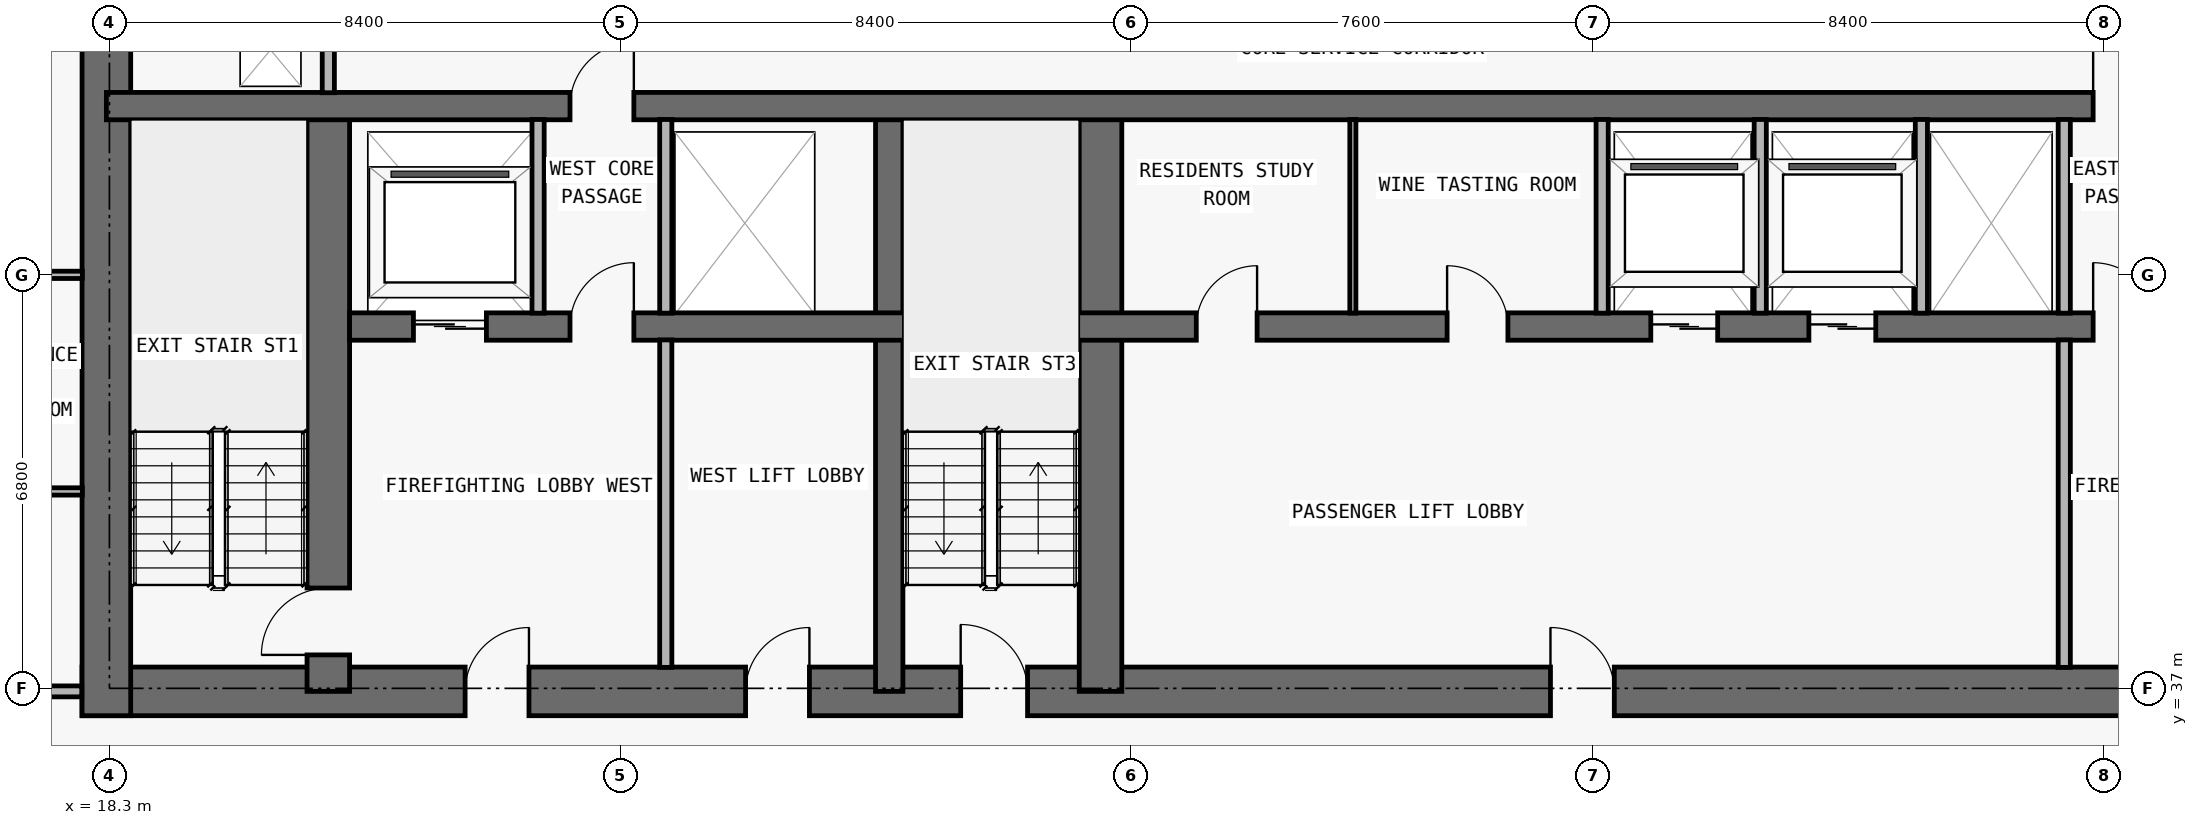
"""IFC4 building model, lengths in metres.
Left out: names, types, materials, properties, quantities, classifications, styles, units other than length and angle.
Written with IfcOpenShell. Run it as: python <this file> out.ifc"""

import sys

from ifc_helpers import new_model, si_unit, direction, frame, frame_2d, origin, place, context, subcontext, project, spatial, rectangle, extrude, element, fill, save


model = new_model("IFC4")
c1 = context("Model", 3, precision=1e-05, world=origin(), true_north=direction((0.0, 1.0)))
c2 = subcontext(c1, "Body", "Model", "MODEL_VIEW")
j1 = project(units=[si_unit("LENGTHUNIT", "METRE"), si_unit("PLANEANGLEUNIT", "RADIAN")], contexts=[c1])
p1 = place(None, origin())
s1 = spatial("IfcSite", under=j1, at=p1, CompositionType="ELEMENT")
p2 = place(p1, origin())
s2 = spatial("IfcBuilding", under=s1, at=p2, CompositionType="ELEMENT")
p3 = place(p2, frame((0.0, 0.0, 145.5)))
s3 = spatial("IfcBuildingStorey", under=s2, at=p3, CompositionType="ELEMENT", Elevation=145.5)
p4 = place(p3, frame((17.85, 36.95, 0.0), z_axis=(0.0, 0.0, 1.0), x_axis=(1.0, 0.0, 0.0)))
e1 = element("IfcWall", 1, at=p4, inside=s3, PredefinedType="SHEAR", context=c2, shape_type="SweptSolid", body=[
    extrude(rectangle(XDim=42.1, YDim=0.8, at=frame_2d((21.05, 0.0))), origin(), (0.0, 0.0, 1.0), 3.05),
])
p5 = place(p4, frame((14.45, 0.0, 0.0)))
e2 = element("IfcOpeningElement", 2, at=p5, cuts=e1, PredefinedType="OPENING", context=c2, shape_type="SweptSolid", body=[
    extrude(rectangle(XDim=1.1, YDim=2.15, at=frame_2d((0.55, 1.075))), frame((0.0, 0.41, 0.0), z_axis=(0.0, -1.0, 0.0), x_axis=(1.0, 0.0, 0.0)), (0.0, 0.0, 1.0), 0.82),
])
p6 = place(p4, frame((6.3, 0.0, 0.0)))
e3 = element("IfcOpeningElement", 3, at=p6, cuts=e1, PredefinedType="OPENING", context=c2, shape_type="SweptSolid", body=[
    extrude(rectangle(XDim=1.05, YDim=2.15, at=frame_2d((0.525, 1.075))), frame((0.0, 0.41, 0.0), z_axis=(0.0, -1.0, 0.0), x_axis=(1.0, 0.0, 0.0)), (0.0, 0.0, 1.0), 0.82),
])
p7 = place(p4, frame((34.8, 0.0, 0.0)))
e4 = element("IfcOpeningElement", 4, at=p7, cuts=e1, PredefinedType="OPENING", context=c2, shape_type="SweptSolid", body=[
    extrude(rectangle(XDim=1.05, YDim=2.15, at=frame_2d((0.525, 1.075))), frame((0.0, 0.41, 0.0), z_axis=(0.0, -1.0, 0.0), x_axis=(1.0, 0.0, 0.0)), (0.0, 0.0, 1.0), 0.82),
])
p8 = place(p4, frame((10.913, 0.0, 0.0)))
e5 = element("IfcOpeningElement", 5, at=p8, cuts=e1, PredefinedType="OPENING", context=c2, shape_type="SweptSolid", body=[
    extrude(rectangle(XDim=1.05, YDim=2.15, at=frame_2d((0.525, 1.075))), frame((0.0, 0.41, 0.0), z_axis=(0.0, -1.0, 0.0), x_axis=(1.0, 0.0, 0.0)), (0.0, 0.0, 1.0), 0.82),
])
p9 = place(p4, frame((24.15, 0.0, 0.0)))
e6 = element("IfcOpeningElement", 6, at=p9, cuts=e1, PredefinedType="OPENING", context=c2, shape_type="SweptSolid", body=[
    extrude(rectangle(XDim=1.05, YDim=2.15, at=frame_2d((0.525, 1.075))), frame((0.0, 0.41, 0.0), z_axis=(0.0, -1.0, 0.0), x_axis=(1.0, 0.0, 0.0)), (0.0, 0.0, 1.0), 0.82),
])
p10 = place(p3, frame((18.25, 36.55, 0.0), z_axis=(0.0, 0.0, 1.0), x_axis=(0.0, 1.0, 0.0)))
e7 = element("IfcWall", 7, at=p10, inside=s3, PredefinedType="SHEAR", context=c2, shape_type="SweptSolid", body=[
    extrude(rectangle(XDim=14.05, YDim=0.8, at=frame_2d((7.025, 0.0))), origin(), (0.0, 0.0, 1.0), 3.05),
])
p11 = place(p3, frame((21.9, 36.95, 0.0), z_axis=(0.0, 0.0, 1.0), x_axis=(0.0, 1.0, 0.0)))
e8 = element("IfcWall", 8, at=p11, inside=s3, PredefinedType="SHEAR", context=c2, shape_type="SweptSolid", body=[
    extrude(rectangle(XDim=9.625, YDim=0.7, at=frame_2d((4.812, 0.0))), origin(), (0.0, 0.0, 1.0), 3.05),
])
p12 = place(p11, frame((0.6, 0.0, 0.0)))
e9 = element("IfcOpeningElement", 9, at=p12, cuts=e8, PredefinedType="OPENING", context=c2, shape_type="SweptSolid", body=[
    extrude(rectangle(XDim=1.1, YDim=2.15, at=frame_2d((0.55, 1.075))), frame((0.0, 0.36, 0.0), z_axis=(0.0, -1.0, 0.0), x_axis=(1.0, 0.0, 0.0)), (0.0, 0.0, 1.0), 0.72),
])
p13 = place(p3, frame((31.125, 36.95, 0.0), z_axis=(0.0, 0.0, 1.0), x_axis=(0.0, 1.0, 0.0)))
e10 = element("IfcWall", 10, at=p13, inside=s3, PredefinedType="SHEAR", context=c2, shape_type="SweptSolid", body=[
    extrude(rectangle(XDim=9.625, YDim=0.45, at=frame_2d((4.812, 0.0))), origin(), (0.0, 0.0, 1.0), 3.05),
])
p14 = place(p3, frame((34.6, 36.95, 0.0), z_axis=(0.0, 0.0, 1.0), x_axis=(0.0, 1.0, 0.0)))
e11 = element("IfcWall", 11, at=p14, inside=s3, PredefinedType="SHEAR", context=c2, shape_type="SweptSolid", body=[
    extrude(rectangle(XDim=9.625, YDim=0.7, at=frame_2d((4.812, 0.0))), origin(), (0.0, 0.0, 1.0), 3.05),
])
p15 = place(p3, frame((22.25, 42.95, 0.0), z_axis=(0.0, 0.0, 1.0), x_axis=(1.0, 0.0, 0.0)))
e12 = element("IfcWall", 12, at=p15, inside=s3, PredefinedType="SHEAR", context=c2, shape_type="SweptSolid", body=[
    extrude(rectangle(XDim=33.3, YDim=0.45, at=frame_2d((16.65, 0.0))), origin(), (0.0, 0.0, 1.0), 3.05),
])
p16 = place(p15, frame((1.05, 0.0, 0.0)))
e13 = element("IfcOpeningElement", 13, at=p16, cuts=e12, PredefinedType="OPENING", context=c2, shape_type="SweptSolid", body=[
    extrude(rectangle(XDim=1.2, YDim=2.2, at=frame_2d((0.6, 1.1))), frame((0.0, 0.235, 0.0), z_axis=(0.0, -1.0, 0.0), x_axis=(1.0, 0.0, 0.0)), (0.0, 0.0, 1.0), 0.47),
])
p17 = place(p15, frame((31.05, 0.0, 0.0)))
e14 = element("IfcOpeningElement", 14, at=p17, cuts=e12, PredefinedType="OPENING", context=c2, shape_type="SweptSolid", body=[
    extrude(rectangle(XDim=1.2, YDim=2.2, at=frame_2d((0.6, 1.1))), frame((0.0, 0.235, 0.0), z_axis=(0.0, -1.0, 0.0), x_axis=(1.0, 0.0, 0.0)), (0.0, 0.0, 1.0), 0.47),
])
p18 = place(p15, frame((21.4, 0.0, 0.0)))
e15 = element("IfcOpeningElement", 15, at=p18, cuts=e12, PredefinedType="OPENING", context=c2, shape_type="SweptSolid", body=[
    extrude(rectangle(XDim=1.1, YDim=2.2, at=frame_2d((0.55, 1.1))), frame((0.0, 0.235, 0.0), z_axis=(0.0, -1.0, 0.0), x_axis=(1.0, 0.0, 0.0)), (0.0, 0.0, 1.0), 0.47),
])
p19 = place(p15, frame((24.0, 0.0, 0.0)))
e16 = element("IfcOpeningElement", 16, at=p19, cuts=e12, PredefinedType="OPENING", context=c2, shape_type="SweptSolid", body=[
    extrude(rectangle(XDim=1.1, YDim=2.2, at=frame_2d((0.55, 1.1))), frame((0.0, 0.235, 0.0), z_axis=(0.0, -1.0, 0.0), x_axis=(1.0, 0.0, 0.0)), (0.0, 0.0, 1.0), 0.47),
])
p20 = place(p15, frame((3.625, 0.0, 0.0)))
e17 = element("IfcOpeningElement", 17, at=p20, cuts=e12, PredefinedType="OPENING", context=c2, shape_type="SweptSolid", body=[
    extrude(rectangle(XDim=1.05, YDim=2.15, at=frame_2d((0.525, 1.075))), frame((0.0, 0.235, 0.0), z_axis=(0.0, -1.0, 0.0), x_axis=(1.0, 0.0, 0.0)), (0.0, 0.0, 1.0), 0.47),
])
p21 = place(p15, frame((28.675, 0.0, 0.0)))
e18 = element("IfcOpeningElement", 18, at=p21, cuts=e12, PredefinedType="OPENING", context=c2, shape_type="SweptSolid", body=[
    extrude(rectangle(XDim=1.05, YDim=2.15, at=frame_2d((0.525, 1.075))), frame((0.0, 0.235, 0.0), z_axis=(0.0, -1.0, 0.0), x_axis=(1.0, 0.0, 0.0)), (0.0, 0.0, 1.0), 0.47),
])
p22 = place(p15, frame((13.925, 0.0, 0.0)))
e19 = element("IfcOpeningElement", 19, at=p22, cuts=e12, PredefinedType="OPENING", context=c2, shape_type="SweptSolid", body=[
    extrude(rectangle(XDim=1.0, YDim=2.2, at=frame_2d((0.5, 1.1))), frame((0.0, 0.235, 0.0), z_axis=(0.0, -1.0, 0.0), x_axis=(1.0, 0.0, 0.0)), (0.0, 0.0, 1.0), 0.47),
])
p23 = place(p15, frame((18.05, 0.0, 0.0)))
e20 = element("IfcOpeningElement", 20, at=p23, cuts=e12, PredefinedType="OPENING", context=c2, shape_type="SweptSolid", body=[
    extrude(rectangle(XDim=1.0, YDim=2.2, at=frame_2d((0.5, 1.1))), frame((0.0, 0.235, 0.0), z_axis=(0.0, -1.0, 0.0), x_axis=(1.0, 0.0, 0.0)), (0.0, 0.0, 1.0), 0.47),
])
p24 = place(p3, frame((18.25, 46.575, 0.0), z_axis=(0.0, 0.0, 1.0), x_axis=(1.0, 0.0, 0.0)))
e21 = element("IfcWall", 21, at=p24, inside=s3, PredefinedType="SHEAR", context=c2, shape_type="SweptSolid", body=[
    extrude(rectangle(XDim=41.3, YDim=0.45, at=frame_2d((20.65, 0.0))), origin(), (0.0, 0.0, 1.0), 3.05),
])
p25 = place(p24, frame((7.625, 0.0, 0.0)))
e22 = element("IfcOpeningElement", 22, at=p25, cuts=e21, PredefinedType="OPENING", context=c2, shape_type="SweptSolid", body=[
    extrude(rectangle(XDim=1.05, YDim=2.15, at=frame_2d((0.525, 1.075))), frame((0.0, 0.235, 0.0), z_axis=(0.0, -1.0, 0.0), x_axis=(1.0, 0.0, 0.0)), (0.0, 0.0, 1.0), 0.47),
])
p26 = place(p24, frame((32.675, 0.0, 0.0)))
e23 = element("IfcOpeningElement", 23, at=p26, cuts=e21, PredefinedType="OPENING", context=c2, shape_type="SweptSolid", body=[
    extrude(rectangle(XDim=1.05, YDim=2.15, at=frame_2d((0.525, 1.075))), frame((0.0, 0.235, 0.0), z_axis=(0.0, -1.0, 0.0), x_axis=(1.0, 0.0, 0.0)), (0.0, 0.0, 1.0), 0.47),
])
p27 = place(p3, frame((21.9, 46.795, 0.0), z_axis=(0.0, 0.0, 1.0), x_axis=(0.0, 1.0, 0.0)))
e24 = element("IfcWall", 24, at=p27, inside=s3, PredefinedType="PARTITIONING", context=c2, shape_type="SweptSolid", body=[
    extrude(rectangle(XDim=3.16, YDim=0.2, at=frame_2d((1.58, 0.0))), origin(), (0.0, 0.0, 1.0), 3.05),
])
p28 = place(p3, frame((25.35, 43.17, 0.0), z_axis=(0.0, 0.0, 1.0), x_axis=(0.0, 1.0, 0.0)))
e25 = element("IfcWall", 25, at=p28, inside=s3, PredefinedType="PARTITIONING", context=c2, shape_type="SweptSolid", body=[
    extrude(rectangle(XDim=3.185, YDim=0.2, at=frame_2d((1.593, 0.0))), origin(), (0.0, 0.0, 1.0), 3.05),
])
p29 = place(p3, frame((27.45, 37.345, 0.0), z_axis=(0.0, 0.0, 1.0), x_axis=(0.0, 1.0, 0.0)))
e26 = element("IfcWall", 26, at=p29, inside=s3, PredefinedType="PARTITIONING", context=c2, shape_type="SweptSolid", body=[
    extrude(rectangle(XDim=5.385, YDim=0.2, at=frame_2d((2.692, 0.0))), origin(), (0.0, 0.0, 1.0), 3.05),
])
p30 = place(p3, frame((27.45, 43.17, 0.0), z_axis=(0.0, 0.0, 1.0), x_axis=(0.0, 1.0, 0.0)))
e27 = element("IfcWall", 27, at=p30, inside=s3, PredefinedType="PARTITIONING", context=c2, shape_type="SweptSolid", body=[
    extrude(rectangle(XDim=3.185, YDim=0.2, at=frame_2d((1.593, 0.0))), origin(), (0.0, 0.0, 1.0), 3.05),
])
p31 = place(p3, frame((38.75, 43.17, 0.0), z_axis=(0.0, 0.0, 1.0), x_axis=(0.0, 1.0, 0.0)))
e28 = element("IfcWall", 28, at=p31, inside=s3, PredefinedType="MOVABLE", context=c2, shape_type="SweptSolid", body=[
    extrude(rectangle(XDim=3.185, YDim=0.1, at=frame_2d((1.593, 0.0))), origin(), (0.0, 0.0, 1.0), 3.05),
])
for number, where, z_axis, x_axis in (
    (29, (42.85, 43.17, 0.0), (0.0, 0.0, 1.0), (0.0, 1.0, 0.0)),
    (30, (45.45, 43.17, 0.0), (0.0, 0.0, 1.0), (0.0, 1.0, 0.0)),
    (31, (48.1, 43.17, 0.0), (0.0, 0.0, 1.0), (0.0, 1.0, 0.0)),
):
    element("IfcWall", number, at=place(p3, frame(where, z_axis=z_axis, x_axis=x_axis)), inside=s3, PredefinedType="PARTITIONING", context=c2, shape_type="SweptSolid", body=[
        extrude(rectangle(XDim=3.185, YDim=0.2, at=frame_2d((1.593, 0.0))), origin(), (0.0, 0.0, 1.0), 3.05),
    ])
p32 = place(p3, frame((50.45, 37.345, 0.0), z_axis=(0.0, 0.0, 1.0), x_axis=(0.0, 1.0, 0.0)))
e32 = element("IfcWall", 32, at=p32, inside=s3, PredefinedType="PARTITIONING", context=c2, shape_type="SweptSolid", body=[
    extrude(rectangle(XDim=5.385, YDim=0.2, at=frame_2d((2.692, 0.0))), origin(), (0.0, 0.0, 1.0), 3.05),
])
p33 = place(p3, frame((50.45, 43.17, 0.0), z_axis=(0.0, 0.0, 1.0), x_axis=(0.0, 1.0, 0.0)))
e33 = element("IfcWall", 33, at=p33, inside=s3, PredefinedType="PARTITIONING", context=c2, shape_type="SweptSolid", body=[
    extrude(rectangle(XDim=3.185, YDim=0.2, at=frame_2d((1.593, 0.0))), origin(), (0.0, 0.0, 1.0), 3.05),
])
p34 = place(p3, frame((7.7, 36.95, 0.0), z_axis=(0.0, 0.0, 1.0), x_axis=(1.0, 0.0, 0.0)))
e34 = element("IfcWall", 34, at=p34, inside=s3, PredefinedType="PARTITIONING", context=c2, shape_type="SweptSolid", body=[
    extrude(rectangle(XDim=10.145, YDim=0.18, at=frame_2d((5.073, 0.0))), origin(), (0.0, 0.0, 1.0), 3.05),
])
p35 = place(p34, frame((5.188, 0.0, 0.0)))
e35 = element("IfcOpeningElement", 35, at=p35, cuts=e34, PredefinedType="OPENING", context=c2, shape_type="SweptSolid", body=[
    extrude(rectangle(XDim=1.0, YDim=2.2, at=frame_2d((0.5, 1.1))), frame((0.0, 0.1, 0.0), z_axis=(0.0, -1.0, 0.0), x_axis=(1.0, 0.0, 0.0)), (0.0, 0.0, 1.0), 0.2),
])
p36 = place(p3, frame((15.6, 40.238, 0.0), z_axis=(0.0, 0.0, 1.0), x_axis=(1.0, 0.0, 0.0)))
e36 = element("IfcWall", 36, at=p36, inside=s3, PredefinedType="PARTITIONING", context=c2, shape_type="SweptSolid", body=[
    extrude(rectangle(XDim=2.255, YDim=0.12, at=frame_2d((1.127, 0.0))), origin(), (0.0, 0.0, 1.0), 3.05),
])
p37 = place(p3, frame((4.195, 43.8, 0.0), z_axis=(0.0, 0.0, 1.0), x_axis=(1.0, 0.0, 0.0)))
e37 = element("IfcWall", 37, at=p37, inside=s3, PredefinedType="PARTITIONING", context=c2, shape_type="SweptSolid", body=[
    extrude(rectangle(XDim=13.66, YDim=0.12, at=frame_2d((6.83, 0.0))), origin(), (0.0, 0.0, 1.0), 2.339),
])
p38 = place(p37, frame((8.743, 0.0, 0.0)))
e38 = element("IfcOpeningElement", 38, at=p38, cuts=e37, PredefinedType="OPENING", context=c2, shape_type="SweptSolid", body=[
    extrude(rectangle(XDim=0.9, YDim=2.15, at=frame_2d((0.45, 1.075))), frame((0.0, 0.07, 0.0), z_axis=(0.0, -1.0, 0.0), x_axis=(1.0, 0.0, 0.0)), (0.0, 0.0, 1.0), 0.14),
])
p39 = place(p37, frame((12.107, 0.0, 0.0)))
e39 = element("IfcOpeningElement", 39, at=p39, cuts=e37, PredefinedType="OPENING", context=c2, shape_type="SweptSolid", body=[
    extrude(rectangle(XDim=0.85, YDim=2.1, at=frame_2d((0.425, 1.05))), frame((0.0, 0.07, 0.0), z_axis=(0.0, -1.0, 0.0), x_axis=(1.0, 0.0, 0.0)), (0.0, 0.0, 1.0), 0.14),
])
p40 = place(p16, origin())
e40 = element("IfcDoor", 40, at=p40, inside=s3, OperationType="DOUBLE_DOOR_SLIDING", PredefinedType="DOOR", context=c2, shape_type="SweptSolid", body=[
    extrude(rectangle(XDim=1.2, YDim=2.2, at=frame_2d((0.6, 1.1))), frame((0.0, 0.025, 0.0), z_axis=(0.0, -1.0, 0.0), x_axis=(1.0, 0.0, 0.0)), (0.0, 0.0, 1.0), 0.05),
])
fill(e13, e40)
p41 = place(p18, origin())
e41 = element("IfcDoor", 41, at=p41, inside=s3, OperationType="DOUBLE_DOOR_SLIDING", PredefinedType="DOOR", context=c2, shape_type="SweptSolid", body=[
    extrude(rectangle(XDim=1.1, YDim=2.2, at=frame_2d((0.55, 1.1))), frame((0.0, 0.025, 0.0), z_axis=(0.0, -1.0, 0.0), x_axis=(1.0, 0.0, 0.0)), (0.0, 0.0, 1.0), 0.05),
])
fill(e15, e41)
p42 = place(p19, origin())
e42 = element("IfcDoor", 42, at=p42, inside=s3, OperationType="DOUBLE_DOOR_SLIDING", PredefinedType="DOOR", context=c2, shape_type="SweptSolid", body=[
    extrude(rectangle(XDim=1.1, YDim=2.2, at=frame_2d((0.55, 1.1))), frame((0.0, 0.025, 0.0), z_axis=(0.0, -1.0, 0.0), x_axis=(1.0, 0.0, 0.0)), (0.0, 0.0, 1.0), 0.05),
])
fill(e16, e42)
p43 = place(p5, origin())
e43 = element("IfcDoor", 43, at=p43, inside=s3, OperationType="SINGLE_SWING_LEFT", PredefinedType="DOOR", context=c2, shape_type="SweptSolid", body=[
    extrude(rectangle(XDim=1.1, YDim=2.15, at=frame_2d((0.55, 1.075))), frame((0.0, 0.025, 0.0), z_axis=(0.0, -1.0, 0.0), x_axis=(1.0, 0.0, 0.0)), (0.0, 0.0, 1.0), 0.05),
])
fill(e2, e43)
p44 = place(p6, origin())
e44 = element("IfcDoor", 44, at=p44, inside=s3, OperationType="SINGLE_SWING_RIGHT", PredefinedType="DOOR", context=c2, shape_type="SweptSolid", body=[
    extrude(rectangle(XDim=1.05, YDim=2.15, at=frame_2d((0.525, 1.075))), frame((0.0, 0.025, 0.0), z_axis=(0.0, -1.0, 0.0), x_axis=(1.0, 0.0, 0.0)), (0.0, 0.0, 1.0), 0.05),
])
fill(e3, e44)
p45 = place(p12, origin())
e45 = element("IfcDoor", 45, at=p45, inside=s3, OperationType="SINGLE_SWING_LEFT", PredefinedType="DOOR", context=c2, shape_type="SweptSolid", body=[
    extrude(rectangle(XDim=1.1, YDim=2.15, at=frame_2d((0.55, 1.075))), frame((0.0, 0.025, 0.0), z_axis=(0.0, -1.0, 0.0), x_axis=(1.0, 0.0, 0.0)), (0.0, 0.0, 1.0), 0.05),
])
fill(e9, e45)
p46 = place(p20, origin())
e46 = element("IfcDoor", 46, at=p46, inside=s3, OperationType="SINGLE_SWING_RIGHT", PredefinedType="DOOR", context=c2, shape_type="SweptSolid", body=[
    extrude(rectangle(XDim=1.05, YDim=2.15, at=frame_2d((0.525, 1.075))), frame((0.0, 0.025, 0.0), z_axis=(0.0, -1.0, 0.0), x_axis=(1.0, 0.0, 0.0)), (0.0, 0.0, 1.0), 0.05),
])
fill(e17, e46)
p47 = place(p21, origin())
e47 = element("IfcDoor", 47, at=p47, inside=s3, OperationType="SINGLE_SWING_LEFT", PredefinedType="DOOR", context=c2, shape_type="SweptSolid", body=[
    extrude(rectangle(XDim=1.05, YDim=2.15, at=frame_2d((0.525, 1.075))), frame((0.0, 0.025, 0.0), z_axis=(0.0, -1.0, 0.0), x_axis=(1.0, 0.0, 0.0)), (0.0, 0.0, 1.0), 0.05),
])
fill(e18, e47)
p48 = place(p8, origin())
e48 = element("IfcDoor", 48, at=p48, inside=s3, OperationType="SINGLE_SWING_RIGHT", PredefinedType="DOOR", context=c2, shape_type="SweptSolid", body=[
    extrude(rectangle(XDim=1.05, YDim=2.15, at=frame_2d((0.525, 1.075))), frame((0.0, 0.025, 0.0), z_axis=(0.0, -1.0, 0.0), x_axis=(1.0, 0.0, 0.0)), (0.0, 0.0, 1.0), 0.05),
])
fill(e5, e48)
p49 = place(p9, origin())
e49 = element("IfcDoor", 49, at=p49, inside=s3, OperationType="SINGLE_SWING_LEFT", PredefinedType="DOOR", context=c2, shape_type="SweptSolid", body=[
    extrude(rectangle(XDim=1.05, YDim=2.15, at=frame_2d((0.525, 1.075))), frame((0.0, 0.025, 0.0), z_axis=(0.0, -1.0, 0.0), x_axis=(1.0, 0.0, 0.0)), (0.0, 0.0, 1.0), 0.05),
])
fill(e6, e49)
p50 = place(p22, origin())
e50 = element("IfcDoor", 50, at=p50, inside=s3, OperationType="SINGLE_SWING_RIGHT", PredefinedType="DOOR", context=c2, shape_type="SweptSolid", body=[
    extrude(rectangle(XDim=1.0, YDim=2.2, at=frame_2d((0.5, 1.1))), frame((0.0, 0.025, 0.0), z_axis=(0.0, -1.0, 0.0), x_axis=(1.0, 0.0, 0.0)), (0.0, 0.0, 1.0), 0.05),
])
fill(e19, e50)
p51 = place(p23, origin())
e51 = element("IfcDoor", 51, at=p51, inside=s3, OperationType="SINGLE_SWING_LEFT", PredefinedType="DOOR", context=c2, shape_type="SweptSolid", body=[
    extrude(rectangle(XDim=1.0, YDim=2.2, at=frame_2d((0.5, 1.1))), frame((0.0, 0.025, 0.0), z_axis=(0.0, -1.0, 0.0), x_axis=(1.0, 0.0, 0.0)), (0.0, 0.0, 1.0), 0.05),
])
fill(e20, e51)
p52 = place(p25, origin())
e52 = element("IfcDoor", 52, at=p52, inside=s3, OperationType="SINGLE_SWING_RIGHT", PredefinedType="DOOR", context=c2, shape_type="SweptSolid", body=[
    extrude(rectangle(XDim=1.05, YDim=2.15, at=frame_2d((0.525, 1.075))), frame((0.0, 0.025, 0.0), z_axis=(0.0, -1.0, 0.0), x_axis=(1.0, 0.0, 0.0)), (0.0, 0.0, 1.0), 0.05),
])
fill(e22, e52)
p53 = place(p26, origin())
e53 = element("IfcDoor", 53, at=p53, inside=s3, OperationType="SINGLE_SWING_LEFT", PredefinedType="DOOR", context=c2, shape_type="SweptSolid", body=[
    extrude(rectangle(XDim=1.05, YDim=2.15, at=frame_2d((0.525, 1.075))), frame((0.0, 0.025, 0.0), z_axis=(0.0, -1.0, 0.0), x_axis=(1.0, 0.0, 0.0)), (0.0, 0.0, 1.0), 0.05),
])
fill(e23, e53)
save(model, sys.argv[1])
